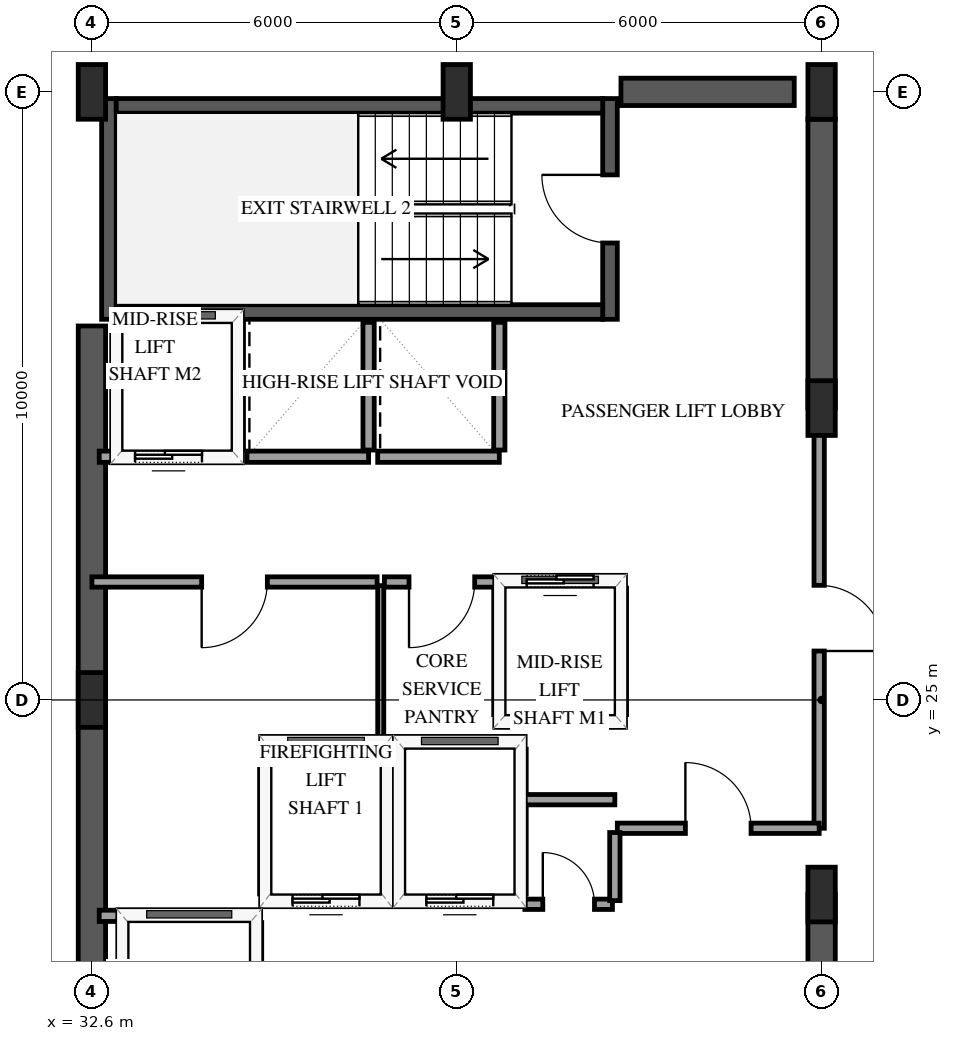
"""IFC4 building model, lengths in metres.
Left out: names, types, materials, properties, quantities, classifications, styles, units other than length and angle.
Written with IfcOpenShell. Run it as: python <this file> out.ifc"""

import sys

from ifc_helpers import new_model, si_unit, direction, frame, frame_2d, origin, origin_2d, place, context, subcontext, project, spatial, rectangle, extrude, element, fill, save


model = new_model("IFC4")
c1 = context("Model", 3, precision=1e-05, world=origin(), true_north=direction((0.0, 1.0)))
c2 = subcontext(c1, "Body", "Model", "MODEL_VIEW")
j1 = project(units=[si_unit("LENGTHUNIT", "METRE"), si_unit("PLANEANGLEUNIT", "RADIAN")], contexts=[c1])
p1 = place(None, origin())
s1 = spatial("IfcSite", under=j1, at=p1, CompositionType="ELEMENT")
p2 = place(p1, origin())
s2 = spatial("IfcBuilding", under=s1, at=p2, CompositionType="ELEMENT")
p3 = place(p2, frame((0.0, 0.0, 230.2)))
s3 = spatial("IfcBuildingStorey", under=s2, at=p3, CompositionType="ELEMENT", Elevation=230.2)
p4 = place(p3, frame((32.88, 31.26, 0.0), z_axis=(0.0, 0.0, 1.0), x_axis=(0.0, 1.0, 0.0)))
e1 = element("IfcWall", 1, at=p4, inside=s3, PredefinedType="SHEAR", context=c2, shape_type="SweptSolid", body=[
    extrude(rectangle(XDim=3.63, YDim=0.24, at=frame_2d((1.815, 0.0))), origin(), (0.0, 0.0, 1.0), 3.6),
])
p5 = place(p3, frame((41.12, 31.26, 0.0), z_axis=(0.0, 0.0, 1.0), x_axis=(0.0, 1.0, 0.0)))
e2 = element("IfcWall", 2, at=p5, inside=s3, PredefinedType="SHEAR", context=c2, shape_type="SweptSolid", body=[
    extrude(rectangle(XDim=3.63, YDim=0.24, at=frame_2d((1.815, 0.0))), origin(), (0.0, 0.0, 1.0), 3.6),
])
p6 = place(p5, frame((1.255, 0.0, 0.0)))
e3 = element("IfcOpeningElement", 3, at=p6, cuts=e2, PredefinedType="OPENING", context=c2, shape_type="SweptSolid", body=[
    extrude(rectangle(XDim=1.12, YDim=2.15, at=frame_2d((0.56, 1.075))), frame((0.0, 0.13, 0.0), z_axis=(0.0, -1.0, 0.0), x_axis=(1.0, 0.0, 0.0)), (0.0, 0.0, 1.0), 0.26),
])
for number, where, z_axis, x_axis in (
    (4, (33.0, 31.38, 0.0), (0.0, 0.0, 1.0), (1.0, 0.0, 0.0)),
    (5, (33.0, 34.77, 0.0), (0.0, 0.0, 1.0), (1.0, 0.0, 0.0)),
):
    element("IfcWall", number, at=place(p3, frame(where, z_axis=z_axis, x_axis=x_axis)), inside=s3, PredefinedType="SHEAR", context=c2, shape_type="SweptSolid", body=[
        extrude(rectangle(XDim=8.0, YDim=0.24, at=frame_2d((4.0, 0.0))), origin(), (0.0, 0.0, 1.0), 3.6),
    ])
p7 = place(p3, frame((32.6, 18.85, 0.0), z_axis=(0.0, 0.0, 1.0), x_axis=(0.0, 1.0, 0.0)))
e6 = element("IfcWall", 6, at=p7, inside=s3, PredefinedType="SHEAR", context=c2, shape_type="SweptSolid", body=[
    extrude(rectangle(XDim=12.3, YDim=0.45, at=frame_2d((6.15, 0.0))), origin(), (0.0, 0.0, 1.0), 3.6),
])
p8 = place(p3, frame((41.3, 35.0, 0.0), z_axis=(0.0, 0.0, 1.0), x_axis=(1.0, 0.0, 0.0)))
e7 = element("IfcWall", 7, at=p8, inside=s3, PredefinedType="SHEAR", context=c2, shape_type="SweptSolid", body=[
    extrude(rectangle(XDim=2.85, YDim=0.45, at=frame_2d((1.425, 0.0))), origin(), (0.0, 0.0, 1.0), 3.6),
])
p9 = place(p3, frame((44.6, 15.45, 0.0), z_axis=(0.0, 0.0, 1.0), x_axis=(0.0, 1.0, 0.0)))
e8 = element("IfcWall", 8, at=p9, inside=s3, PredefinedType="SHEAR", context=c2, shape_type="SweptSolid", body=[
    extrude(rectangle(XDim=6.35, YDim=0.45, at=frame_2d((3.175, 0.0))), origin(), (0.0, 0.0, 1.0), 3.6),
])
p10 = place(p3, frame((44.6, 29.8, 0.0), z_axis=(0.0, 0.0, 1.0), x_axis=(0.0, 1.0, 0.0)))
e9 = element("IfcWall", 9, at=p10, inside=s3, PredefinedType="SHEAR", context=c2, shape_type="SweptSolid", body=[
    extrude(rectangle(XDim=4.75, YDim=0.45, at=frame_2d((2.375, 0.0))), origin(), (0.0, 0.0, 1.0), 3.6),
])
for number, where, z_axis, x_axis in (
    (10, (32.6, 25.0, 0.0), (0.0, 0.0, 1.0), (1.0, 0.0, 0.0)),
    (11, (32.6, 35.0, 0.0), (0.0, 0.0, 1.0), (1.0, 0.0, 0.0)),
    (12, (38.6, 35.0, 0.0), (0.0, 0.0, 1.0), (1.0, 0.0, 0.0)),
    (13, (44.6, 21.8, 0.0), (0.0, 0.0, 1.0), (1.0, 0.0, 0.0)),
    (14, (44.6, 29.8, 0.0), (0.0, 0.0, 1.0), (1.0, 0.0, 0.0)),
    (15, (44.6, 35.0, 0.0), (0.0, 0.0, 1.0), (1.0, 0.0, 0.0)),
):
    element("IfcColumn", number, at=place(p3, frame(where, z_axis=z_axis, x_axis=x_axis)), inside=s3, PredefinedType="PILASTER", context=c2, shape_type="SweptSolid", body=[
        extrude(rectangle(XDim=0.45, YDim=0.9, at=origin_2d()), origin(), (0.0, 0.0, 1.0), 3.6),
    ])
p11 = place(p3, frame((35.45, 21.7, 0.0), z_axis=(0.0, 0.0, 1.0), x_axis=(1.0, 0.0, 0.0)))
e16 = element("IfcWall", 16, at=p11, inside=s3, PredefinedType="SOLIDWALL", context=c2, shape_type="SweptSolid", body=[
    extrude(rectangle(XDim=2.0, YDim=0.185, at=frame_2d((1.0, 0.0))), origin(), (0.0, 0.0, 1.0), 3.3),
])
p12 = place(p11, frame((0.45, 0.0, 0.0)))
e17 = element("IfcOpeningElement", 17, at=p12, cuts=e16, PredefinedType="OPENING", context=c2, shape_type="SweptSolid", body=[
    extrude(rectangle(XDim=1.1, YDim=2.15, at=frame_2d((0.55, 1.075))), frame((0.0, 0.103, 0.0), z_axis=(0.0, -1.0, 0.0), x_axis=(1.0, 0.0, 0.0)), (0.0, 0.0, 1.0), 0.205),
])
p13 = place(p3, frame((35.45, 24.3, 0.0), z_axis=(0.0, 0.0, 1.0), x_axis=(1.0, 0.0, 0.0)))
e18 = element("IfcWall", 18, at=p13, inside=s3, PredefinedType="SOLIDWALL", context=c2, shape_type="SweptSolid", body=[
    extrude(rectangle(XDim=2.0, YDim=0.185, at=frame_2d((1.0, 0.0))), origin(), (0.0, 0.0, 1.0), 3.3),
])
for number, where, z_axis, x_axis in (
    (19, (35.45, 21.81, 0.0), (0.0, 0.0, 1.0), (0.0, 1.0, 0.0)),
    (20, (37.45, 21.81, 0.0), (0.0, 0.0, 1.0), (0.0, 1.0, 0.0)),
):
    element("IfcWall", number, at=place(p3, frame(where, z_axis=z_axis, x_axis=x_axis)), inside=s3, PredefinedType="SOLIDWALL", context=c2, shape_type="SweptSolid", body=[
        extrude(rectangle(XDim=2.38, YDim=0.185, at=frame_2d((1.19, 0.0))), origin(), (0.0, 0.0, 1.0), 3.3),
    ])
p14 = place(p3, frame((37.65, 21.7, 0.0), z_axis=(0.0, 0.0, 1.0), x_axis=(1.0, 0.0, 0.0)))
e21 = element("IfcWall", 21, at=p14, inside=s3, PredefinedType="SOLIDWALL", context=c2, shape_type="SweptSolid", body=[
    extrude(rectangle(XDim=2.0, YDim=0.185, at=frame_2d((1.0, 0.0))), origin(), (0.0, 0.0, 1.0), 3.3),
])
p15 = place(p14, frame((0.45, 0.0, 0.0)))
e22 = element("IfcOpeningElement", 22, at=p15, cuts=e21, PredefinedType="OPENING", context=c2, shape_type="SweptSolid", body=[
    extrude(rectangle(XDim=1.1, YDim=2.15, at=frame_2d((0.55, 1.075))), frame((0.0, 0.103, 0.0), z_axis=(0.0, -1.0, 0.0), x_axis=(1.0, 0.0, 0.0)), (0.0, 0.0, 1.0), 0.205),
])
p16 = place(p3, frame((37.65, 24.3, 0.0), z_axis=(0.0, 0.0, 1.0), x_axis=(1.0, 0.0, 0.0)))
e23 = element("IfcWall", 23, at=p16, inside=s3, PredefinedType="SOLIDWALL", context=c2, shape_type="SweptSolid", body=[
    extrude(rectangle(XDim=2.0, YDim=0.185, at=frame_2d((1.0, 0.0))), origin(), (0.0, 0.0, 1.0), 3.3),
])
p17 = place(p3, frame((39.65, 21.81, 0.0), z_axis=(0.0, 0.0, 1.0), x_axis=(0.0, 1.0, 0.0)))
e24 = element("IfcWall", 24, at=p17, inside=s3, PredefinedType="SOLIDWALL", context=c2, shape_type="SweptSolid", body=[
    extrude(rectangle(XDim=2.38, YDim=0.185, at=frame_2d((1.19, 0.0))), origin(), (0.0, 0.0, 1.0), 3.3),
])
p18 = place(p3, frame((32.72, 21.45, 0.0), z_axis=(0.0, 0.0, 1.0), x_axis=(1.0, 0.0, 0.0)))
e25 = element("IfcWall", 25, at=p18, inside=s3, PredefinedType="SOLIDWALL", context=c2, shape_type="SweptSolid", body=[
    extrude(rectangle(XDim=2.58, YDim=0.185, at=frame_2d((1.29, 0.0))), origin(), (0.0, 0.0, 1.0), 3.3),
])
p19 = place(p3, frame((35.3, 18.79, 0.0), z_axis=(0.0, 0.0, 1.0), x_axis=(0.0, 1.0, 0.0)))
e26 = element("IfcWall", 26, at=p19, inside=s3, PredefinedType="SOLIDWALL", context=c2, shape_type="SweptSolid", body=[
    extrude(rectangle(XDim=2.55, YDim=0.185, at=frame_2d((1.275, 0.0))), origin(), (0.0, 0.0, 1.0), 3.3),
])
p20 = place(p19, frame((0.725, 0.0, 0.0)))
e27 = element("IfcOpeningElement", 27, at=p20, cuts=e26, PredefinedType="OPENING", context=c2, shape_type="SweptSolid", body=[
    extrude(rectangle(XDim=1.1, YDim=2.15, at=frame_2d((0.55, 1.075))), frame((0.0, 0.103, 0.0), z_axis=(0.0, -1.0, 0.0), x_axis=(1.0, 0.0, 0.0)), (0.0, 0.0, 1.0), 0.205),
])
p21 = place(p3, frame((39.3, 24.65, 0.0), z_axis=(0.0, 0.0, 1.0), x_axis=(1.0, 0.0, 0.0)))
e28 = element("IfcWall", 28, at=p21, inside=s3, PredefinedType="SOLIDWALL", context=c2, shape_type="SweptSolid", body=[
    extrude(rectangle(XDim=2.0, YDim=0.185, at=frame_2d((1.0, 0.0))), origin(), (0.0, 0.0, 1.0), 3.3),
])
p22 = place(p3, frame((39.3, 26.95, 0.0), z_axis=(0.0, 0.0, 1.0), x_axis=(1.0, 0.0, 0.0)))
e29 = element("IfcWall", 29, at=p22, inside=s3, PredefinedType="SOLIDWALL", context=c2, shape_type="SweptSolid", body=[
    extrude(rectangle(XDim=2.0, YDim=0.185, at=frame_2d((1.0, 0.0))), origin(), (0.0, 0.0, 1.0), 3.3),
])
p23 = place(p22, frame((0.45, 0.0, 0.0)))
e30 = element("IfcOpeningElement", 30, at=p23, cuts=e29, PredefinedType="OPENING", context=c2, shape_type="SweptSolid", body=[
    extrude(rectangle(XDim=1.1, YDim=2.15, at=frame_2d((0.55, 1.075))), frame((0.0, 0.103, 0.0), z_axis=(0.0, -1.0, 0.0), x_axis=(1.0, 0.0, 0.0)), (0.0, 0.0, 1.0), 0.205),
])
for number, where, z_axis, x_axis in (
    (31, (39.3, 24.76, 0.0), (0.0, 0.0, 1.0), (0.0, 1.0, 0.0)),
    (32, (41.3, 24.76, 0.0), (0.0, 0.0, 1.0), (0.0, 1.0, 0.0)),
):
    element("IfcWall", number, at=place(p3, frame(where, z_axis=z_axis, x_axis=x_axis)), inside=s3, PredefinedType="SOLIDWALL", context=c2, shape_type="SweptSolid", body=[
        extrude(rectangle(XDim=2.08, YDim=0.185, at=frame_2d((1.04, 0.0))), origin(), (0.0, 0.0, 1.0), 3.3),
    ])
p24 = place(p3, frame((32.72, 29.0, 0.0), z_axis=(0.0, 0.0, 1.0), x_axis=(1.0, 0.0, 0.0)))
e33 = element("IfcWall", 33, at=p24, inside=s3, PredefinedType="SOLIDWALL", context=c2, shape_type="SweptSolid", body=[
    extrude(rectangle(XDim=2.28, YDim=0.185, at=frame_2d((1.14, 0.0))), origin(), (0.0, 0.0, 1.0), 3.3),
])
p25 = place(p24, frame((0.59, 0.0, 0.0)))
e34 = element("IfcOpeningElement", 34, at=p25, cuts=e33, PredefinedType="OPENING", context=c2, shape_type="SweptSolid", body=[
    extrude(rectangle(XDim=1.1, YDim=2.15, at=frame_2d((0.55, 1.075))), frame((0.0, 0.103, 0.0), z_axis=(0.0, -1.0, 0.0), x_axis=(1.0, 0.0, 0.0)), (0.0, 0.0, 1.0), 0.205),
])
p26 = place(p3, frame((35.0, 29.11, 0.0), z_axis=(0.0, 0.0, 1.0), x_axis=(0.0, 1.0, 0.0)))
e35 = element("IfcWall", 35, at=p26, inside=s3, PredefinedType="SOLIDWALL", context=c2, shape_type="SweptSolid", body=[
    extrude(rectangle(XDim=2.1, YDim=0.185, at=frame_2d((1.05, 0.0))), origin(), (0.0, 0.0, 1.0), 3.3),
])
p27 = place(p3, frame((35.15, 29.0, 0.0), z_axis=(0.0, 0.0, 1.0), x_axis=(1.0, 0.0, 0.0)))
e36 = element("IfcWall", 36, at=p27, inside=s3, PredefinedType="SOLIDWALL", context=c2, shape_type="SweptSolid", body=[
    extrude(rectangle(XDim=2.0, YDim=0.185, at=frame_2d((1.0, 0.0))), origin(), (0.0, 0.0, 1.0), 3.3),
])
p28 = place(p3, frame((37.15, 29.11, 0.0), z_axis=(0.0, 0.0, 1.0), x_axis=(0.0, 1.0, 0.0)))
e37 = element("IfcWall", 37, at=p28, inside=s3, PredefinedType="SOLIDWALL", context=c2, shape_type="SweptSolid", body=[
    extrude(rectangle(XDim=2.1, YDim=0.185, at=frame_2d((1.05, 0.0))), origin(), (0.0, 0.0, 1.0), 3.3),
])
p29 = place(p3, frame((37.3, 29.0, 0.0), z_axis=(0.0, 0.0, 1.0), x_axis=(1.0, 0.0, 0.0)))
e38 = element("IfcWall", 38, at=p29, inside=s3, PredefinedType="SOLIDWALL", context=c2, shape_type="SweptSolid", body=[
    extrude(rectangle(XDim=2.0, YDim=0.185, at=frame_2d((1.0, 0.0))), origin(), (0.0, 0.0, 1.0), 3.3),
])
p30 = place(p3, frame((39.3, 29.11, 0.0), z_axis=(0.0, 0.0, 1.0), x_axis=(0.0, 1.0, 0.0)))
e39 = element("IfcWall", 39, at=p30, inside=s3, PredefinedType="SOLIDWALL", context=c2, shape_type="SweptSolid", body=[
    extrude(rectangle(XDim=2.1, YDim=0.185, at=frame_2d((1.05, 0.0))), origin(), (0.0, 0.0, 1.0), 3.3),
])
p31 = place(p3, frame((44.56, 29.8, 0.0), z_axis=(0.0, 0.0, 1.0), x_axis=(0.0, -1.0, 0.0)))
e40 = element("IfcWall", 40, at=p31, inside=s3, PredefinedType="PARTITIONING", context=c2, shape_type="SweptSolid", body=[
    extrude(rectangle(XDim=6.91, YDim=0.17, at=frame_2d((3.455, 0.0))), origin(), (0.0, 0.0, 1.0), 2.34),
])
p32 = place(p31, frame((2.915, 0.0, 0.0)))
e41 = element("IfcOpeningElement", 41, at=p32, cuts=e40, PredefinedType="OPENING", context=c2, shape_type="SweptSolid", body=[
    extrude(rectangle(XDim=1.08, YDim=2.15, at=frame_2d((0.54, 1.075))), frame((0.0, 0.095, 0.0), z_axis=(0.0, -1.0, 0.0), x_axis=(1.0, 0.0, 0.0)), (0.0, 0.0, 1.0), 0.19),
])
p33 = place(p3, frame((37.29, 26.94, 0.0), z_axis=(0.0, 0.0, 1.0), x_axis=(-1.0, 0.0, 0.0)))
e42 = element("IfcWall", 42, at=p33, inside=s3, PredefinedType="PARTITIONING", context=c2, shape_type="SweptSolid", body=[
    extrude(rectangle(XDim=4.69, YDim=0.17, at=frame_2d((2.345, 0.0))), origin(), (0.0, 0.0, 1.0), 3.3),
])
p34 = place(p33, frame((1.805, 0.0, 0.0)))
e43 = element("IfcOpeningElement", 43, at=p34, cuts=e42, PredefinedType="OPENING", context=c2, shape_type="SweptSolid", body=[
    extrude(rectangle(XDim=1.08, YDim=2.15, at=frame_2d((0.54, 1.075))), frame((0.0, 0.095, 0.0), z_axis=(0.0, -1.0, 0.0), x_axis=(1.0, 0.0, 0.0)), (0.0, 0.0, 1.0), 0.19),
])
p35 = place(p3, frame((41.24, 22.89, 0.0), z_axis=(0.0, 0.0, 1.0), x_axis=(1.0, 0.0, 0.0)))
e44 = element("IfcWall", 44, at=p35, inside=s3, PredefinedType="PARTITIONING", context=c2, shape_type="SweptSolid", body=[
    extrude(rectangle(XDim=3.32, YDim=0.17, at=frame_2d((1.66, 0.0))), origin(), (0.0, 0.0, 1.0), 3.3),
])
p36 = place(p35, frame((1.12, 0.0, 0.0)))
e45 = element("IfcOpeningElement", 45, at=p36, cuts=e44, PredefinedType="OPENING", context=c2, shape_type="SweptSolid", body=[
    extrude(rectangle(XDim=1.08, YDim=2.15, at=frame_2d((0.54, 1.075))), frame((0.0, 0.095, 0.0), z_axis=(0.0, -1.0, 0.0), x_axis=(1.0, 0.0, 0.0)), (0.0, 0.0, 1.0), 0.19),
])
p37 = place(p3, frame((37.35, 26.88, 0.0), z_axis=(0.0, 0.0, 1.0), x_axis=(0.0, -1.0, 0.0)))
e46 = element("IfcWall", 46, at=p37, inside=s3, PredefinedType="PARTITIONING", context=c2, shape_type="SweptSolid", body=[
    extrude(rectangle(XDim=2.58, YDim=0.1, at=frame_2d((1.29, 0.0))), origin(), (0.0, 0.0, 1.0), 3.3),
])
p38 = place(p3, frame((39.3, 26.94, 0.0), z_axis=(0.0, 0.0, 1.0), x_axis=(-1.0, 0.0, 0.0)))
e47 = element("IfcWall", 47, at=p38, inside=s3, PredefinedType="PARTITIONING", context=c2, shape_type="SweptSolid", body=[
    extrude(rectangle(XDim=1.89, YDim=0.17, at=frame_2d((0.945, 0.0))), origin(), (0.0, 0.0, 1.0), 3.3),
])
p39 = place(p38, frame((0.405, 0.0, 0.0)))
e48 = element("IfcOpeningElement", 48, at=p39, cuts=e47, PredefinedType="OPENING", context=c2, shape_type="SweptSolid", body=[
    extrude(rectangle(XDim=1.08, YDim=2.15, at=frame_2d((0.54, 1.075))), frame((0.0, 0.095, 0.0), z_axis=(0.0, -1.0, 0.0), x_axis=(1.0, 0.0, 0.0)), (0.0, 0.0, 1.0), 0.19),
])
p40 = place(p3, frame((39.72, 21.64, 0.0), z_axis=(0.0, 0.0, 1.0), x_axis=(1.0, 0.0, 0.0)))
e49 = element("IfcWall", 49, at=p40, inside=s3, PredefinedType="PARTITIONING", context=c2, shape_type="SweptSolid", body=[
    extrude(rectangle(XDim=1.44, YDim=0.17, at=frame_2d((0.72, 0.0))), origin(), (0.0, 0.0, 1.0), 3.3),
])
p41 = place(p40, frame((0.295, 0.0, 0.0)))
e50 = element("IfcOpeningElement", 50, at=p41, cuts=e49, PredefinedType="OPENING", context=c2, shape_type="SweptSolid", body=[
    extrude(rectangle(XDim=0.85, YDim=2.1, at=frame_2d((0.425, 1.05))), frame((0.0, 0.095, 0.0), z_axis=(0.0, -1.0, 0.0), x_axis=(1.0, 0.0, 0.0)), (0.0, 0.0, 1.0), 0.19),
])
p42 = place(p3, frame((41.2, 21.7, 0.0), z_axis=(0.0, 0.0, 1.0), x_axis=(0.0, 1.0, 0.0)))
e51 = element("IfcWall", 51, at=p42, inside=s3, PredefinedType="PARTITIONING", context=c2, shape_type="SweptSolid", body=[
    extrude(rectangle(XDim=1.12, YDim=0.17, at=frame_2d((0.56, 0.0))), origin(), (0.0, 0.0, 1.0), 3.3),
])
p43 = place(p3, frame((41.2, 23.36, 0.0), z_axis=(0.0, 0.0, 1.0), x_axis=(-1.0, 0.0, 0.0)))
e52 = element("IfcWall", 52, at=p43, inside=s3, PredefinedType="PARTITIONING", context=c2, shape_type="SweptSolid", body=[
    extrude(rectangle(XDim=1.48, YDim=0.17, at=frame_2d((0.74, 0.0))), origin(), (0.0, 0.0, 1.0), 3.3),
])
p44 = place(p12, origin())
e53 = element("IfcDoor", 53, at=p44, inside=s3, OperationType="SLIDING_TO_LEFT", PredefinedType="DOOR", context=c2, shape_type="SweptSolid", body=[
    extrude(rectangle(XDim=1.1, YDim=2.15, at=frame_2d((0.55, 1.075))), frame((0.0, 0.025, 0.0), z_axis=(0.0, -1.0, 0.0), x_axis=(1.0, 0.0, 0.0)), (0.0, 0.0, 1.0), 0.05),
])
fill(e17, e53)
p45 = place(p15, origin())
e54 = element("IfcDoor", 54, at=p45, inside=s3, OperationType="SLIDING_TO_LEFT", PredefinedType="DOOR", context=c2, shape_type="SweptSolid", body=[
    extrude(rectangle(XDim=1.1, YDim=2.15, at=frame_2d((0.55, 1.075))), frame((0.0, 0.025, 0.0), z_axis=(0.0, -1.0, 0.0), x_axis=(1.0, 0.0, 0.0)), (0.0, 0.0, 1.0), 0.05),
])
fill(e22, e54)
p46 = place(p23, origin())
e55 = element("IfcDoor", 55, at=p46, inside=s3, OperationType="SLIDING_TO_LEFT", PredefinedType="DOOR", context=c2, shape_type="SweptSolid", body=[
    extrude(rectangle(XDim=1.1, YDim=2.15, at=frame_2d((0.55, 1.075))), frame((0.0, 0.025, 0.0), z_axis=(0.0, -1.0, 0.0), x_axis=(1.0, 0.0, 0.0)), (0.0, 0.0, 1.0), 0.05),
])
fill(e30, e55)
p47 = place(p25, origin())
e56 = element("IfcDoor", 56, at=p47, inside=s3, OperationType="SLIDING_TO_LEFT", PredefinedType="DOOR", context=c2, shape_type="SweptSolid", body=[
    extrude(rectangle(XDim=1.1, YDim=2.15, at=frame_2d((0.55, 1.075))), frame((0.0, 0.025, 0.0), z_axis=(0.0, -1.0, 0.0), x_axis=(1.0, 0.0, 0.0)), (0.0, 0.0, 1.0), 0.05),
])
fill(e34, e56)
p48 = place(p6, origin())
e57 = element("IfcDoor", 57, at=p48, inside=s3, OperationType="SINGLE_SWING_RIGHT", PredefinedType="DOOR", context=c2, shape_type="SweptSolid", body=[
    extrude(rectangle(XDim=1.12, YDim=2.15, at=frame_2d((0.56, 1.075))), frame((0.0, 0.025, 0.0), z_axis=(0.0, -1.0, 0.0), x_axis=(1.0, 0.0, 0.0)), (0.0, 0.0, 1.0), 0.05),
])
fill(e3, e57)
p49 = place(p32, origin())
e58 = element("IfcDoor", 58, at=p49, inside=s3, OperationType="SINGLE_SWING_RIGHT", PredefinedType="DOOR", context=c2, shape_type="SweptSolid", body=[
    extrude(rectangle(XDim=1.08, YDim=2.15, at=frame_2d((0.54, 1.075))), frame((0.0, 0.025, 0.0), z_axis=(0.0, -1.0, 0.0), x_axis=(1.0, 0.0, 0.0)), (0.0, 0.0, 1.0), 0.05),
])
fill(e41, e58)
p50 = place(p34, origin())
e59 = element("IfcDoor", 59, at=p50, inside=s3, OperationType="SINGLE_SWING_RIGHT", PredefinedType="DOOR", context=c2, shape_type="SweptSolid", body=[
    extrude(rectangle(XDim=1.08, YDim=2.15, at=frame_2d((0.54, 1.075))), frame((0.0, 0.025, 0.0), z_axis=(0.0, -1.0, 0.0), x_axis=(1.0, 0.0, 0.0)), (0.0, 0.0, 1.0), 0.05),
])
fill(e43, e59)
p51 = place(p36, origin())
e60 = element("IfcDoor", 60, at=p51, inside=s3, OperationType="SINGLE_SWING_LEFT", PredefinedType="DOOR", context=c2, shape_type="SweptSolid", body=[
    extrude(rectangle(XDim=1.08, YDim=2.15, at=frame_2d((0.54, 1.075))), frame((0.0, 0.025, 0.0), z_axis=(0.0, -1.0, 0.0), x_axis=(1.0, 0.0, 0.0)), (0.0, 0.0, 1.0), 0.05),
])
fill(e45, e60)
p52 = place(p39, origin())
e61 = element("IfcDoor", 61, at=p52, inside=s3, OperationType="SINGLE_SWING_RIGHT", PredefinedType="DOOR", context=c2, shape_type="SweptSolid", body=[
    extrude(rectangle(XDim=1.08, YDim=2.15, at=frame_2d((0.54, 1.075))), frame((0.0, 0.025, 0.0), z_axis=(0.0, -1.0, 0.0), x_axis=(1.0, 0.0, 0.0)), (0.0, 0.0, 1.0), 0.05),
])
fill(e48, e61)
p53 = place(p41, origin())
e62 = element("IfcDoor", 62, at=p53, inside=s3, OperationType="SINGLE_SWING_LEFT", PredefinedType="DOOR", context=c2, shape_type="SweptSolid", body=[
    extrude(rectangle(XDim=0.85, YDim=2.1, at=frame_2d((0.425, 1.05))), frame((0.0, 0.025, 0.0), z_axis=(0.0, -1.0, 0.0), x_axis=(1.0, 0.0, 0.0)), (0.0, 0.0, 1.0), 0.05),
])
fill(e50, e62)
save(model, sys.argv[1])
